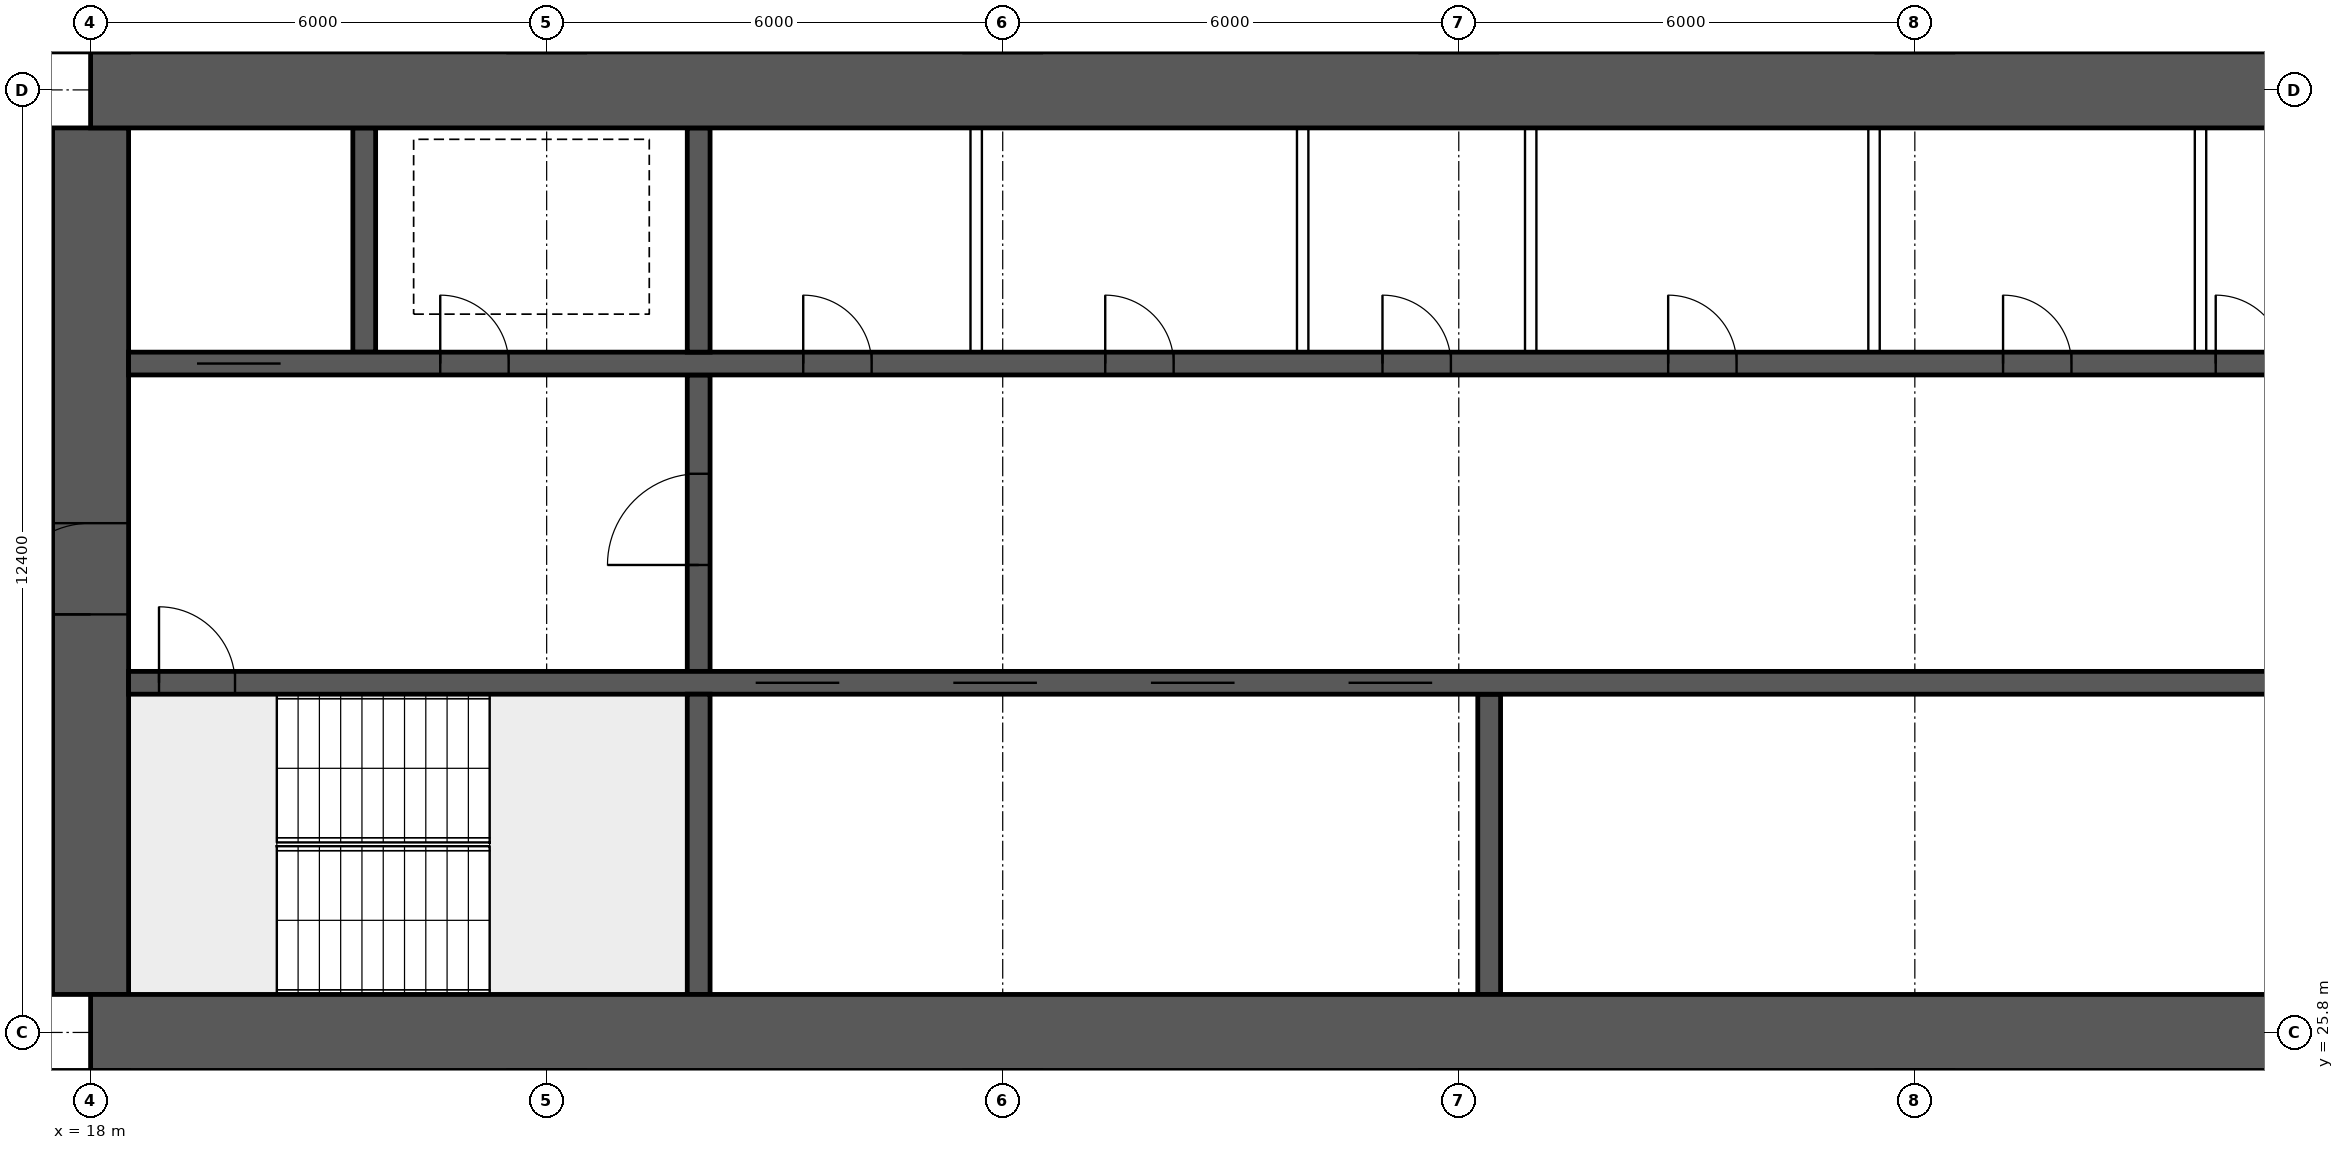
"""IFC4 building model, lengths in metres.
Left out: names, types, materials, properties, quantities, classifications, styles, units other than length and angle.
Written with IfcOpenShell. Run it as: python <this file> out.ifc"""

import sys

from ifc_helpers import new_model, si_unit, direction, frame, frame_2d, origin, place, context, subcontext, project, spatial, rectangle, extrude, element, fill, save


model = new_model("IFC4")
c1 = context("Model", 3, precision=1e-05, world=origin(), true_north=direction((0.0, 1.0)))
c2 = subcontext(c1, "Body", "Model", "MODEL_VIEW")
j1 = project(units=[si_unit("LENGTHUNIT", "METRE"), si_unit("PLANEANGLEUNIT", "RADIAN")], contexts=[c1])
p1 = place(None, origin())
s1 = spatial("IfcSite", under=j1, at=p1, CompositionType="ELEMENT")
p2 = place(p1, origin())
s2 = spatial("IfcBuilding", under=s1, at=p2, CompositionType="ELEMENT")
p3 = place(p2, frame((0.0, 0.0, 35.2)))
s3 = spatial("IfcBuildingStorey", under=s2, at=p3, CompositionType="ELEMENT", Elevation=35.2)
for number, where, z_axis, x_axis in (
    (1, (18.0, 25.8, 0.0), (0.0, 0.0, 1.0), (1.0, 0.0, 0.0)),
    (2, (18.0, 38.2, 0.0), (0.0, 0.0, 1.0), (1.0, 0.0, 0.0)),
):
    element("IfcWall", number, at=place(p3, frame(where, z_axis=z_axis, x_axis=x_axis)), inside=s3, PredefinedType="SHEAR", context=c2, shape_type="SweptSolid", body=[
        extrude(rectangle(XDim=48.0, YDim=1.0, at=frame_2d((24.0, 0.0))), origin(), (0.0, 0.0, 1.0), 3.75),
    ])
p4 = place(p3, frame((18.0, 26.3, 0.0), z_axis=(0.0, 0.0, 1.0), x_axis=(0.0, 1.0, 0.0)))
e3 = element("IfcWall", 3, at=p4, inside=s3, PredefinedType="SHEAR", context=c2, shape_type="SweptSolid", body=[
    extrude(rectangle(XDim=11.4, YDim=1.0, at=frame_2d((5.7, 0.0))), origin(), (0.0, 0.0, 1.0), 3.75),
])
p5 = place(p4, frame((5.0, 0.0, 0.0)))
e4 = element("IfcOpeningElement", 4, at=p5, cuts=e3, PredefinedType="OPENING", context=c2, shape_type="SweptSolid", body=[
    extrude(rectangle(XDim=1.2, YDim=2.1, at=frame_2d((0.6, 1.05))), frame((0.0, 0.51, 0.0), z_axis=(0.0, -1.0, 0.0), x_axis=(1.0, 0.0, 0.0)), (0.0, 0.0, 1.0), 1.02),
])
p6 = place(p3, frame((18.5, 30.4, 0.0), z_axis=(0.0, 0.0, 1.0), x_axis=(1.0, 0.0, 0.0)))
e5 = element("IfcWall", 5, at=p6, inside=s3, PredefinedType="SHEAR", context=c2, shape_type="SweptSolid", body=[
    extrude(rectangle(XDim=47.0, YDim=0.3, at=frame_2d((23.5, 0.0))), origin(), (0.0, 0.0, 1.0), 3.75),
])
p7 = place(p6, frame((0.4, 0.0, 0.0)))
e6 = element("IfcOpeningElement", 6, at=p7, cuts=e5, PredefinedType="OPENING", context=c2, shape_type="SweptSolid", body=[
    extrude(rectangle(XDim=1.0, YDim=2.1, at=frame_2d((0.5, 1.05))), frame((0.0, 0.16, 0.0), z_axis=(0.0, -1.0, 0.0), x_axis=(1.0, 0.0, 0.0)), (0.0, 0.0, 1.0), 0.32),
])
p8 = place(p6, frame((45.6, 0.0, 0.0)))
e7 = element("IfcOpeningElement", 7, at=p8, cuts=e5, PredefinedType="OPENING", context=c2, shape_type="SweptSolid", body=[
    extrude(rectangle(XDim=1.0, YDim=2.1, at=frame_2d((0.5, 1.05))), frame((0.0, 0.16, 0.0), z_axis=(0.0, -1.0, 0.0), x_axis=(1.0, 0.0, 0.0)), (0.0, 0.0, 1.0), 0.32),
])
p9 = place(p6, frame((8.25, 0.0, 0.0)))
e8 = element("IfcOpeningElement", 8, at=p9, cuts=e5, PredefinedType="OPENING", context=c2, shape_type="SweptSolid", body=[
    extrude(rectangle(XDim=1.1, YDim=2.1, at=frame_2d((0.55, 1.05))), frame((0.0, 0.16, 0.0), z_axis=(0.0, -1.0, 0.0), x_axis=(1.0, 0.0, 0.0)), (0.0, 0.0, 1.0), 0.32),
])
p10 = place(p6, frame((10.85, 0.0, 0.0)))
e9 = element("IfcOpeningElement", 9, at=p10, cuts=e5, PredefinedType="OPENING", context=c2, shape_type="SweptSolid", body=[
    extrude(rectangle(XDim=1.1, YDim=2.1, at=frame_2d((0.55, 1.05))), frame((0.0, 0.16, 0.0), z_axis=(0.0, -1.0, 0.0), x_axis=(1.0, 0.0, 0.0)), (0.0, 0.0, 1.0), 0.32),
])
p11 = place(p6, frame((13.45, 0.0, 0.0)))
e10 = element("IfcOpeningElement", 10, at=p11, cuts=e5, PredefinedType="OPENING", context=c2, shape_type="SweptSolid", body=[
    extrude(rectangle(XDim=1.1, YDim=2.1, at=frame_2d((0.55, 1.05))), frame((0.0, 0.16, 0.0), z_axis=(0.0, -1.0, 0.0), x_axis=(1.0, 0.0, 0.0)), (0.0, 0.0, 1.0), 0.32),
])
p12 = place(p6, frame((16.05, 0.0, 0.0)))
e11 = element("IfcOpeningElement", 11, at=p12, cuts=e5, PredefinedType="OPENING", context=c2, shape_type="SweptSolid", body=[
    extrude(rectangle(XDim=1.1, YDim=2.1, at=frame_2d((0.55, 1.05))), frame((0.0, 0.16, 0.0), z_axis=(0.0, -1.0, 0.0), x_axis=(1.0, 0.0, 0.0)), (0.0, 0.0, 1.0), 0.32),
])
p13 = place(p6, frame((30.117, 0.0, 0.0)))
e12 = element("IfcOpeningElement", 12, at=p13, cuts=e5, PredefinedType="OPENING", context=c2, shape_type="SweptSolid", body=[
    extrude(rectangle(XDim=1.1, YDim=2.1, at=frame_2d((0.55, 1.05))), frame((0.0, 0.16, 0.0), z_axis=(0.0, -1.0, 0.0), x_axis=(1.0, 0.0, 0.0)), (0.0, 0.0, 1.0), 0.32),
])
p14 = place(p6, frame((33.65, 0.0, 0.0)))
e13 = element("IfcOpeningElement", 13, at=p14, cuts=e5, PredefinedType="OPENING", context=c2, shape_type="SweptSolid", body=[
    extrude(rectangle(XDim=1.1, YDim=2.1, at=frame_2d((0.55, 1.05))), frame((0.0, 0.16, 0.0), z_axis=(0.0, -1.0, 0.0), x_axis=(1.0, 0.0, 0.0)), (0.0, 0.0, 1.0), 0.32),
])
p15 = place(p6, frame((37.183, 0.0, 0.0)))
e14 = element("IfcOpeningElement", 14, at=p15, cuts=e5, PredefinedType="OPENING", context=c2, shape_type="SweptSolid", body=[
    extrude(rectangle(XDim=1.1, YDim=2.1, at=frame_2d((0.55, 1.05))), frame((0.0, 0.16, 0.0), z_axis=(0.0, -1.0, 0.0), x_axis=(1.0, 0.0, 0.0)), (0.0, 0.0, 1.0), 0.32),
])
p16 = place(p3, frame((18.5, 34.6, 0.0), z_axis=(0.0, 0.0, 1.0), x_axis=(1.0, 0.0, 0.0)))
e15 = element("IfcWall", 15, at=p16, inside=s3, PredefinedType="SHEAR", context=c2, shape_type="SweptSolid", body=[
    extrude(rectangle(XDim=47.0, YDim=0.3, at=frame_2d((23.5, 0.0))), origin(), (0.0, 0.0, 1.0), 3.75),
])
p17 = place(p16, frame((0.9, 0.0, 0.0)))
e16 = element("IfcOpeningElement", 16, at=p17, cuts=e15, PredefinedType="OPENING", context=c2, shape_type="SweptSolid", body=[
    extrude(rectangle(XDim=1.1, YDim=2.1, at=frame_2d((0.55, 1.05))), frame((0.0, 0.16, 0.0), z_axis=(0.0, -1.0, 0.0), x_axis=(1.0, 0.0, 0.0)), (0.0, 0.0, 1.0), 0.32),
])
p18 = place(p16, frame((45.0, 0.0, 0.0)))
e17 = element("IfcOpeningElement", 17, at=p18, cuts=e15, PredefinedType="OPENING", context=c2, shape_type="SweptSolid", body=[
    extrude(rectangle(XDim=1.1, YDim=2.1, at=frame_2d((0.55, 1.05))), frame((0.0, 0.16, 0.0), z_axis=(0.0, -1.0, 0.0), x_axis=(1.0, 0.0, 0.0)), (0.0, 0.0, 1.0), 0.32),
])
p19 = place(p16, frame((4.1, 0.0, 0.0)))
e18 = element("IfcOpeningElement", 18, at=p19, cuts=e15, PredefinedType="OPENING", context=c2, shape_type="SweptSolid", body=[
    extrude(rectangle(XDim=0.9, YDim=2.1, at=frame_2d((0.45, 1.05))), frame((0.0, 0.16, 0.0), z_axis=(0.0, -1.0, 0.0), x_axis=(1.0, 0.0, 0.0)), (0.0, 0.0, 1.0), 0.32),
])
p20 = place(p16, frame((42.0, 0.0, 0.0)))
e19 = element("IfcOpeningElement", 19, at=p20, cuts=e15, PredefinedType="OPENING", context=c2, shape_type="SweptSolid", body=[
    extrude(rectangle(XDim=0.9, YDim=2.1, at=frame_2d((0.45, 1.05))), frame((0.0, 0.16, 0.0), z_axis=(0.0, -1.0, 0.0), x_axis=(1.0, 0.0, 0.0)), (0.0, 0.0, 1.0), 0.32),
])
p21 = place(p16, frame((8.875, 0.0, 0.0)))
e20 = element("IfcOpeningElement", 20, at=p21, cuts=e15, PredefinedType="OPENING", context=c2, shape_type="SweptSolid", body=[
    extrude(rectangle(XDim=0.9, YDim=2.1, at=frame_2d((0.45, 1.05))), frame((0.0, 0.16, 0.0), z_axis=(0.0, -1.0, 0.0), x_axis=(1.0, 0.0, 0.0)), (0.0, 0.0, 1.0), 0.32),
])
p22 = place(p16, frame((12.849, 0.0, 0.0)))
e21 = element("IfcOpeningElement", 21, at=p22, cuts=e15, PredefinedType="OPENING", context=c2, shape_type="SweptSolid", body=[
    extrude(rectangle(XDim=0.9, YDim=2.1, at=frame_2d((0.45, 1.05))), frame((0.0, 0.16, 0.0), z_axis=(0.0, -1.0, 0.0), x_axis=(1.0, 0.0, 0.0)), (0.0, 0.0, 1.0), 0.32),
])
p23 = place(p16, frame((16.496, 0.0, 0.0)))
e22 = element("IfcOpeningElement", 22, at=p23, cuts=e15, PredefinedType="OPENING", context=c2, shape_type="SweptSolid", body=[
    extrude(rectangle(XDim=0.9, YDim=2.1, at=frame_2d((0.45, 1.05))), frame((0.0, 0.16, 0.0), z_axis=(0.0, -1.0, 0.0), x_axis=(1.0, 0.0, 0.0)), (0.0, 0.0, 1.0), 0.32),
])
p24 = place(p16, frame((20.255, 0.0, 0.0)))
e23 = element("IfcOpeningElement", 23, at=p24, cuts=e15, PredefinedType="OPENING", context=c2, shape_type="SweptSolid", body=[
    extrude(rectangle(XDim=0.9, YDim=2.1, at=frame_2d((0.45, 1.05))), frame((0.0, 0.16, 0.0), z_axis=(0.0, -1.0, 0.0), x_axis=(1.0, 0.0, 0.0)), (0.0, 0.0, 1.0), 0.32),
])
p25 = place(p16, frame((24.661, 0.0, 0.0)))
e24 = element("IfcOpeningElement", 24, at=p25, cuts=e15, PredefinedType="OPENING", context=c2, shape_type="SweptSolid", body=[
    extrude(rectangle(XDim=0.9, YDim=2.1, at=frame_2d((0.45, 1.05))), frame((0.0, 0.16, 0.0), z_axis=(0.0, -1.0, 0.0), x_axis=(1.0, 0.0, 0.0)), (0.0, 0.0, 1.0), 0.32),
])
p26 = place(p16, frame((27.458, 0.0, 0.0)))
e25 = element("IfcOpeningElement", 25, at=p26, cuts=e15, PredefinedType="OPENING", context=c2, shape_type="SweptSolid", body=[
    extrude(rectangle(XDim=0.9, YDim=2.1, at=frame_2d((0.45, 1.05))), frame((0.0, 0.16, 0.0), z_axis=(0.0, -1.0, 0.0), x_axis=(1.0, 0.0, 0.0)), (0.0, 0.0, 1.0), 0.32),
])
p27 = place(p16, frame((33.579, 0.0, 0.0)))
e26 = element("IfcOpeningElement", 26, at=p27, cuts=e15, PredefinedType="OPENING", context=c2, shape_type="SweptSolid", body=[
    extrude(rectangle(XDim=0.9, YDim=2.1, at=frame_2d((0.45, 1.05))), frame((0.0, 0.16, 0.0), z_axis=(0.0, -1.0, 0.0), x_axis=(1.0, 0.0, 0.0)), (0.0, 0.0, 1.0), 0.32),
])
p28 = place(p3, frame((26.0, 26.3, 0.0), z_axis=(0.0, 0.0, 1.0), x_axis=(0.0, 1.0, 0.0)))
e27 = element("IfcWall", 27, at=p28, inside=s3, PredefinedType="SHEAR", context=c2, shape_type="SweptSolid", body=[
    extrude(rectangle(XDim=3.95, YDim=0.3, at=frame_2d((1.975, 0.0))), origin(), (0.0, 0.0, 1.0), 3.75),
])
p29 = place(p3, frame((26.0, 30.55, 0.0), z_axis=(0.0, 0.0, 1.0), x_axis=(0.0, 1.0, 0.0)))
e28 = element("IfcWall", 28, at=p29, inside=s3, PredefinedType="SHEAR", context=c2, shape_type="SweptSolid", body=[
    extrude(rectangle(XDim=3.9, YDim=0.3, at=frame_2d((1.95, 0.0))), origin(), (0.0, 0.0, 1.0), 3.75),
])
p30 = place(p29, frame((1.4, 0.0, 0.0)))
e29 = element("IfcOpeningElement", 29, at=p30, cuts=e28, PredefinedType="OPENING", context=c2, shape_type="SweptSolid", body=[
    extrude(rectangle(XDim=1.2, YDim=2.1, at=frame_2d((0.6, 1.05))), frame((0.0, 0.16, 0.0), z_axis=(0.0, -1.0, 0.0), x_axis=(1.0, 0.0, 0.0)), (0.0, 0.0, 1.0), 0.32),
])
for number, where, z_axis, x_axis in (
    (30, (21.6, 34.75, 0.0), (0.0, 0.0, 1.0), (0.0, 1.0, 0.0)),
    (31, (26.0, 34.75, 0.0), (0.0, 0.0, 1.0), (0.0, 1.0, 0.0)),
):
    element("IfcWall", number, at=place(p3, frame(where, z_axis=z_axis, x_axis=x_axis)), inside=s3, PredefinedType="SHEAR", context=c2, shape_type="SweptSolid", body=[
        extrude(rectangle(XDim=2.95, YDim=0.3, at=frame_2d((1.475, 0.0))), origin(), (0.0, 0.0, 1.0), 3.75),
    ])
p31 = place(p3, frame((36.4, 26.3, 0.0), z_axis=(0.0, 0.0, 1.0), x_axis=(0.0, 1.0, 0.0)))
e32 = element("IfcWall", 32, at=p31, inside=s3, PredefinedType="SHEAR", context=c2, shape_type="SweptSolid", body=[
    extrude(rectangle(XDim=3.95, YDim=0.3, at=frame_2d((1.975, 0.0))), origin(), (0.0, 0.0, 1.0), 3.75),
])
for number, where, z_axis, x_axis in (
    (33, (29.651, 34.75, 0.0), (0.0, 0.0, 1.0), (0.0, 1.0, 0.0)),
    (34, (33.946, 34.75, 0.0), (0.0, 0.0, 1.0), (0.0, 1.0, 0.0)),
    (35, (36.946, 34.75, 0.0), (0.0, 0.0, 1.0), (0.0, 1.0, 0.0)),
    (36, (41.463, 34.75, 0.0), (0.0, 0.0, 1.0), (0.0, 1.0, 0.0)),
    (37, (45.758, 34.75, 0.0), (0.0, 0.0, 1.0), (0.0, 1.0, 0.0)),
):
    element("IfcWall", number, at=place(p3, frame(where, z_axis=z_axis, x_axis=x_axis)), inside=s3, PredefinedType="SOLIDWALL", context=c2, shape_type="SweptSolid", body=[
        extrude(rectangle(XDim=2.95, YDim=0.15, at=frame_2d((1.475, 0.0))), origin(), (0.0, 0.0, 1.0), 3.3),
    ])
for number, where, z_axis, x_axis in (
    (38, (20.68, 14.9, 0.0), (0.0, 0.0, 1.0), (0.0, 1.0, 0.0)),
    (39, (27.075, 14.9, 0.0), (0.0, 0.0, 1.0), (0.0, 1.0, 0.0)),
    (40, (38.81, 14.9, 0.0), (0.0, 0.0, 1.0), (0.0, 1.0, 0.0)),
):
    element("IfcWall", number, at=place(p3, frame(where, z_axis=z_axis, x_axis=x_axis)), inside=s3, PredefinedType="PARTITIONING", context=c2, shape_type="SweptSolid", body=[
        extrude(rectangle(XDim=10.4, YDim=0.15, at=frame_2d((5.2, 0.0))), origin(), (0.0, 0.0, 1.0), 3.3),
    ])
p32 = place(p5, origin())
e41 = element("IfcDoor", 41, at=p32, inside=s3, OperationType="SINGLE_SWING_LEFT", PredefinedType="DOOR", context=c2, shape_type="SweptSolid", body=[
    extrude(rectangle(XDim=1.2, YDim=2.1, at=frame_2d((0.6, 1.05))), frame((0.0, 0.025, 0.0), z_axis=(0.0, -1.0, 0.0), x_axis=(1.0, 0.0, 0.0)), (0.0, 0.0, 1.0), 0.05),
])
fill(e4, e41)
p33 = place(p7, origin())
e42 = element("IfcDoor", 42, at=p33, inside=s3, OperationType="SINGLE_SWING_LEFT", PredefinedType="DOOR", context=c2, shape_type="SweptSolid", body=[
    extrude(rectangle(XDim=1.0, YDim=2.1, at=frame_2d((0.5, 1.05))), frame((0.0, 0.025, 0.0), z_axis=(0.0, -1.0, 0.0), x_axis=(1.0, 0.0, 0.0)), (0.0, 0.0, 1.0), 0.05),
])
fill(e6, e42)
p34 = place(p17, origin())
e43 = element("IfcDoor", 43, at=p34, inside=s3, OperationType="DOUBLE_DOOR_SLIDING", PredefinedType="DOOR", context=c2, shape_type="SweptSolid", body=[
    extrude(rectangle(XDim=1.1, YDim=2.1, at=frame_2d((0.55, 1.05))), frame((0.0, 0.025, 0.0), z_axis=(0.0, -1.0, 0.0), x_axis=(1.0, 0.0, 0.0)), (0.0, 0.0, 1.0), 0.05),
])
fill(e16, e43)
p35 = place(p19, origin())
e44 = element("IfcDoor", 44, at=p35, inside=s3, OperationType="SINGLE_SWING_LEFT", PredefinedType="DOOR", context=c2, shape_type="SweptSolid", body=[
    extrude(rectangle(XDim=0.9, YDim=2.1, at=frame_2d((0.45, 1.05))), frame((0.0, 0.025, 0.0), z_axis=(0.0, -1.0, 0.0), x_axis=(1.0, 0.0, 0.0)), (0.0, 0.0, 1.0), 0.05),
])
fill(e18, e44)
p36 = place(p30, origin())
e45 = element("IfcDoor", 45, at=p36, inside=s3, OperationType="SINGLE_SWING_LEFT", PredefinedType="DOOR", context=c2, shape_type="SweptSolid", body=[
    extrude(rectangle(XDim=1.2, YDim=2.1, at=frame_2d((0.6, 1.05))), frame((0.0, 0.025, 0.0), z_axis=(0.0, -1.0, 0.0), x_axis=(1.0, 0.0, 0.0)), (0.0, 0.0, 1.0), 0.05),
])
fill(e29, e45)
p37 = place(p21, origin())
e46 = element("IfcDoor", 46, at=p37, inside=s3, OperationType="SINGLE_SWING_LEFT", PredefinedType="DOOR", context=c2, shape_type="SweptSolid", body=[
    extrude(rectangle(XDim=0.9, YDim=2.1, at=frame_2d((0.45, 1.05))), frame((0.0, 0.025, 0.0), z_axis=(0.0, -1.0, 0.0), x_axis=(1.0, 0.0, 0.0)), (0.0, 0.0, 1.0), 0.05),
])
fill(e20, e46)
p38 = place(p22, origin())
e47 = element("IfcDoor", 47, at=p38, inside=s3, OperationType="SINGLE_SWING_LEFT", PredefinedType="DOOR", context=c2, shape_type="SweptSolid", body=[
    extrude(rectangle(XDim=0.9, YDim=2.1, at=frame_2d((0.45, 1.05))), frame((0.0, 0.025, 0.0), z_axis=(0.0, -1.0, 0.0), x_axis=(1.0, 0.0, 0.0)), (0.0, 0.0, 1.0), 0.05),
])
fill(e21, e47)
p39 = place(p23, origin())
e48 = element("IfcDoor", 48, at=p39, inside=s3, OperationType="SINGLE_SWING_LEFT", PredefinedType="DOOR", context=c2, shape_type="SweptSolid", body=[
    extrude(rectangle(XDim=0.9, YDim=2.1, at=frame_2d((0.45, 1.05))), frame((0.0, 0.025, 0.0), z_axis=(0.0, -1.0, 0.0), x_axis=(1.0, 0.0, 0.0)), (0.0, 0.0, 1.0), 0.05),
])
fill(e22, e48)
p40 = place(p24, origin())
e49 = element("IfcDoor", 49, at=p40, inside=s3, OperationType="SINGLE_SWING_LEFT", PredefinedType="DOOR", context=c2, shape_type="SweptSolid", body=[
    extrude(rectangle(XDim=0.9, YDim=2.1, at=frame_2d((0.45, 1.05))), frame((0.0, 0.025, 0.0), z_axis=(0.0, -1.0, 0.0), x_axis=(1.0, 0.0, 0.0)), (0.0, 0.0, 1.0), 0.05),
])
fill(e23, e49)
p41 = place(p25, origin())
e50 = element("IfcDoor", 50, at=p41, inside=s3, OperationType="SINGLE_SWING_LEFT", PredefinedType="DOOR", context=c2, shape_type="SweptSolid", body=[
    extrude(rectangle(XDim=0.9, YDim=2.1, at=frame_2d((0.45, 1.05))), frame((0.0, 0.025, 0.0), z_axis=(0.0, -1.0, 0.0), x_axis=(1.0, 0.0, 0.0)), (0.0, 0.0, 1.0), 0.05),
])
fill(e24, e50)
p42 = place(p26, origin())
e51 = element("IfcDoor", 51, at=p42, inside=s3, OperationType="SINGLE_SWING_LEFT", PredefinedType="DOOR", context=c2, shape_type="SweptSolid", body=[
    extrude(rectangle(XDim=0.9, YDim=2.1, at=frame_2d((0.45, 1.05))), frame((0.0, 0.025, 0.0), z_axis=(0.0, -1.0, 0.0), x_axis=(1.0, 0.0, 0.0)), (0.0, 0.0, 1.0), 0.05),
])
fill(e25, e51)
p43 = place(p9, origin())
e52 = element("IfcDoor", 52, at=p43, inside=s3, OperationType="DOUBLE_DOOR_SLIDING", PredefinedType="DOOR", context=c2, shape_type="SweptSolid", body=[
    extrude(rectangle(XDim=1.1, YDim=2.1, at=frame_2d((0.55, 1.05))), frame((0.0, 0.025, 0.0), z_axis=(0.0, -1.0, 0.0), x_axis=(1.0, 0.0, 0.0)), (0.0, 0.0, 1.0), 0.05),
])
fill(e8, e52)
p44 = place(p10, origin())
e53 = element("IfcDoor", 53, at=p44, inside=s3, OperationType="DOUBLE_DOOR_SLIDING", PredefinedType="DOOR", context=c2, shape_type="SweptSolid", body=[
    extrude(rectangle(XDim=1.1, YDim=2.1, at=frame_2d((0.55, 1.05))), frame((0.0, 0.025, 0.0), z_axis=(0.0, -1.0, 0.0), x_axis=(1.0, 0.0, 0.0)), (0.0, 0.0, 1.0), 0.05),
])
fill(e9, e53)
p45 = place(p11, origin())
e54 = element("IfcDoor", 54, at=p45, inside=s3, OperationType="DOUBLE_DOOR_SLIDING", PredefinedType="DOOR", context=c2, shape_type="SweptSolid", body=[
    extrude(rectangle(XDim=1.1, YDim=2.1, at=frame_2d((0.55, 1.05))), frame((0.0, 0.025, 0.0), z_axis=(0.0, -1.0, 0.0), x_axis=(1.0, 0.0, 0.0)), (0.0, 0.0, 1.0), 0.05),
])
fill(e10, e54)
p46 = place(p12, origin())
e55 = element("IfcDoor", 55, at=p46, inside=s3, OperationType="DOUBLE_DOOR_SLIDING", PredefinedType="DOOR", context=c2, shape_type="SweptSolid", body=[
    extrude(rectangle(XDim=1.1, YDim=2.1, at=frame_2d((0.55, 1.05))), frame((0.0, 0.025, 0.0), z_axis=(0.0, -1.0, 0.0), x_axis=(1.0, 0.0, 0.0)), (0.0, 0.0, 1.0), 0.05),
])
fill(e11, e55)
save(model, sys.argv[1])
